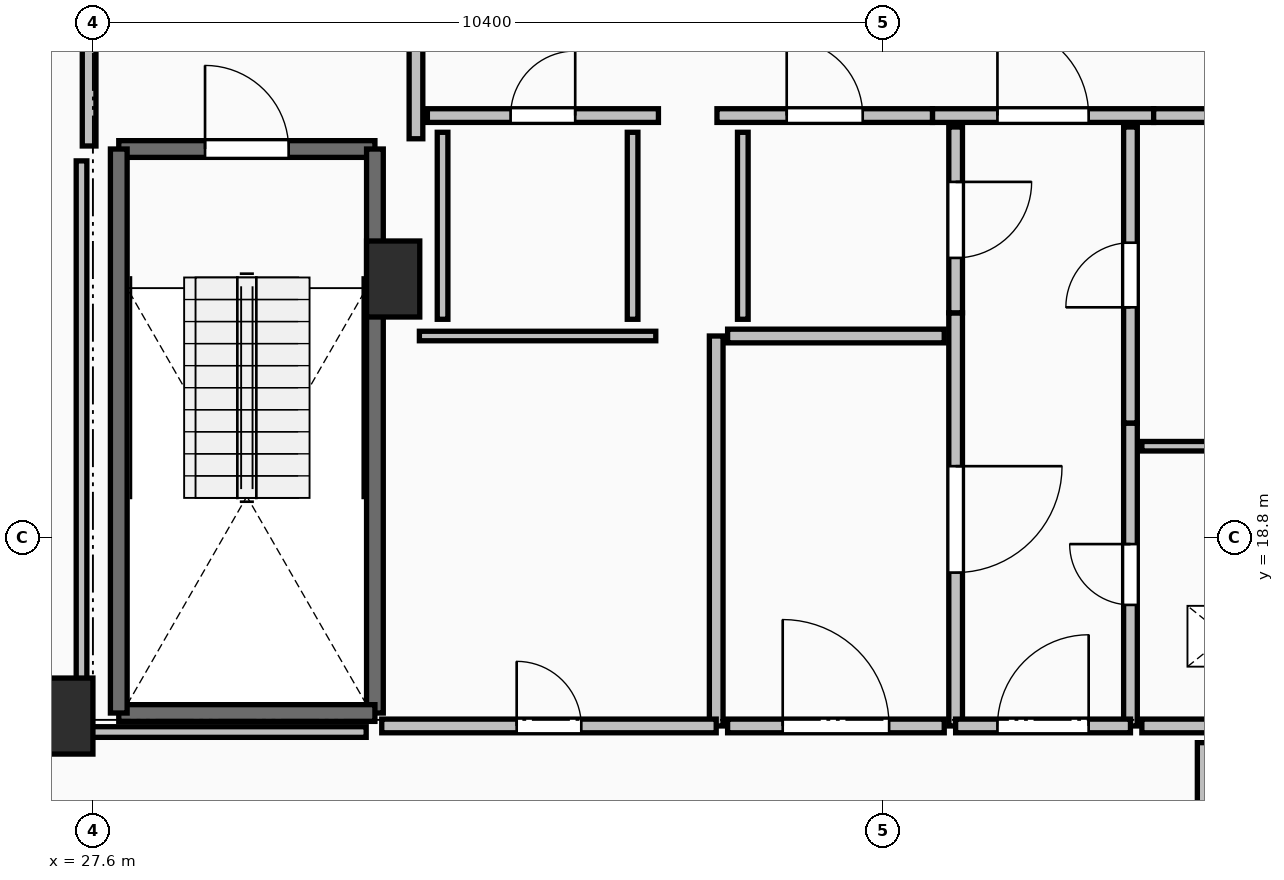
"""IFC4 building model, lengths in metres.
Left out: names, types, materials, properties, quantities, classifications, styles, units other than length and angle.
Written with IfcOpenShell. Run it as: python <this file> out.ifc"""

import sys

from ifc_helpers import new_model, si_unit, direction, frame, frame_2d, origin, origin_2d, place, context, subcontext, project, spatial, rectangle, extrude, element, fill, save


model = new_model("IFC4")
c1 = context("Model", 3, precision=1e-05, world=origin(), true_north=direction((0.0, 1.0)))
c2 = subcontext(c1, "Body", "Model", "MODEL_VIEW")
j1 = project(units=[si_unit("LENGTHUNIT", "METRE"), si_unit("PLANEANGLEUNIT", "RADIAN")], contexts=[c1])
p1 = place(None, origin())
s1 = spatial("IfcSite", under=j1, at=p1, CompositionType="ELEMENT")
p2 = place(p1, origin())
s2 = spatial("IfcBuilding", under=s1, at=p2, CompositionType="ELEMENT")
p3 = place(p2, frame((0.0, 0.0, 255.55)))
s3 = spatial("IfcBuildingStorey", under=s2, at=p3, CompositionType="ELEMENT", Elevation=255.55)
for number, where, z_axis, x_axis in (
    (1, (27.25, 16.45, 0.0), (0.0, 0.0, 1.0), (1.0, 0.0, 0.0)),
    (2, (31.55, 22.2, 0.0), (0.0, 0.0, 1.0), (1.0, 0.0, 0.0)),
):
    element("IfcColumn", number, at=place(p3, frame(where, z_axis=z_axis, x_axis=x_axis)), inside=s3, PredefinedType="PILASTER", context=c2, shape_type="SweptSolid", body=[
        extrude(rectangle(XDim=0.7, YDim=1.0, at=origin_2d()), origin(), (0.0, 0.0, 1.0), 3.55),
    ])
p4 = place(p3, frame((27.94, 23.91, 0.0), z_axis=(0.0, 0.0, 1.0), x_axis=(1.0, 0.0, 0.0)))
e3 = element("IfcWall", 3, at=p4, inside=s3, PredefinedType="SOLIDWALL", context=c2, shape_type="SweptSolid", body=[
    extrude(rectangle(XDim=3.37, YDim=0.22, at=frame_2d((1.685, 0.0))), origin(), (0.0, 0.0, 1.0), 3.29),
])
p5 = place(p4, frame((1.135, 0.0, 0.0)))
e4 = element("IfcOpeningElement", 4, at=p5, cuts=e3, PredefinedType="OPENING", context=c2, shape_type="SweptSolid", body=[
    extrude(rectangle(XDim=1.1, YDim=2.15, at=frame_2d((0.55, 1.075))), frame((0.0, 0.125, 0.0), z_axis=(0.0, -1.0, 0.0), x_axis=(1.0, 0.0, 0.0)), (0.0, 0.0, 1.0), 0.25),
])
p6 = place(p3, frame((31.31, 23.91, 0.0), z_axis=(0.0, 0.0, 1.0), x_axis=(0.0, -1.0, 0.0)))
e5 = element("IfcWall", 5, at=p6, inside=s3, PredefinedType="SOLIDWALL", context=c2, shape_type="SweptSolid", body=[
    extrude(rectangle(XDim=7.42, YDim=0.22, at=frame_2d((3.71, 0.0))), origin(), (0.0, 0.0, 1.0), 3.29),
])
p7 = place(p3, frame((31.31, 16.49, 0.0), z_axis=(0.0, 0.0, 1.0), x_axis=(-1.0, 0.0, 0.0)))
e6 = element("IfcWall", 6, at=p7, inside=s3, PredefinedType="SOLIDWALL", context=c2, shape_type="SweptSolid", body=[
    extrude(rectangle(XDim=3.37, YDim=0.22, at=frame_2d((1.685, 0.0))), origin(), (0.0, 0.0, 1.0), 3.29),
])
p8 = place(p3, frame((27.94, 16.49, 0.0), z_axis=(0.0, 0.0, 1.0), x_axis=(0.0, 1.0, 0.0)))
e7 = element("IfcWall", 7, at=p8, inside=s3, PredefinedType="SOLIDWALL", context=c2, shape_type="SweptSolid", body=[
    extrude(rectangle(XDim=7.42, YDim=0.22, at=frame_2d((3.71, 0.0))), origin(), (0.0, 0.0, 1.0), 3.29),
])
p9 = place(p3, frame((31.85, 24.045, 0.0), z_axis=(0.0, 0.0, 1.0), x_axis=(0.0, 1.0, 0.0)))
e8 = element("IfcWall", 8, at=p9, inside=s3, PredefinedType="PARTITIONING", context=c2, shape_type="SweptSolid", body=[
    extrude(rectangle(XDim=3.91, YDim=0.18, at=frame_2d((1.955, 0.0))), origin(), (0.0, 0.0, 1.0), 3.29),
])
p10 = place(p9, frame((1.355, 0.0, 0.0)))
e9 = element("IfcOpeningElement", 9, at=p10, cuts=e8, PredefinedType="OPENING", context=c2, shape_type="SweptSolid", body=[
    extrude(rectangle(XDim=1.2, YDim=2.15, at=frame_2d((0.6, 1.075))), frame((0.0, 0.105, 0.0), z_axis=(0.0, -1.0, 0.0), x_axis=(1.0, 0.0, 0.0)), (0.0, 0.0, 1.0), 0.21),
])
p11 = place(p3, frame((27.55, 28.0, 0.0), z_axis=(0.0, 0.0, 1.0), x_axis=(0.0, -1.0, 0.0)))
e10 = element("IfcWall", 10, at=p11, inside=s3, PredefinedType="PARTITIONING", context=c2, shape_type="SweptSolid", body=[
    extrude(rectangle(XDim=4.05, YDim=0.18, at=frame_2d((2.025, 0.0))), origin(), (0.0, 0.0, 1.0), 3.29),
])
p12 = place(p11, frame((1.425, 0.0, 0.0)))
e11 = element("IfcOpeningElement", 11, at=p12, cuts=e10, PredefinedType="OPENING", context=c2, shape_type="SweptSolid", body=[
    extrude(rectangle(XDim=1.2, YDim=2.15, at=frame_2d((0.6, 1.075))), frame((0.0, 0.105, 0.0), z_axis=(0.0, -1.0, 0.0), x_axis=(1.0, 0.0, 0.0)), (0.0, 0.0, 1.0), 0.21),
])
p13 = place(p3, frame((38.645, 24.35, 0.0), z_axis=(0.0, 0.0, 1.0), x_axis=(1.0, 0.0, 0.0)))
e12 = element("IfcWall", 12, at=p13, inside=s3, PredefinedType="PARTITIONING", context=c2, shape_type="SweptSolid", body=[
    extrude(rectangle(XDim=2.91, YDim=0.18, at=frame_2d((1.455, 0.0))), origin(), (0.0, 0.0, 1.0), 3.29),
])
p14 = place(p13, frame((0.855, 0.0, 0.0)))
e13 = element("IfcOpeningElement", 13, at=p14, cuts=e12, PredefinedType="OPENING", context=c2, shape_type="SweptSolid", body=[
    extrude(rectangle(XDim=1.2, YDim=2.15, at=frame_2d((0.6, 1.075))), frame((0.0, 0.105, 0.0), z_axis=(0.0, -1.0, 0.0), x_axis=(1.0, 0.0, 0.0)), (0.0, 0.0, 1.0), 0.21),
])
p15 = place(p3, frame((41.555, 24.35, 0.0), z_axis=(0.0, 0.0, 1.0), x_axis=(1.0, 0.0, 0.0)))
e14 = element("IfcWall", 14, at=p15, inside=s3, PredefinedType="PARTITIONING", context=c2, shape_type="SweptSolid", body=[
    extrude(rectangle(XDim=2.445, YDim=0.18, at=frame_2d((1.223, 0.0))), origin(), (0.0, 0.0, 1.0), 3.29),
])
p16 = place(p15, frame((0.798, 0.0, 0.0)))
e15 = element("IfcOpeningElement", 15, at=p16, cuts=e14, PredefinedType="OPENING", context=c2, shape_type="SweptSolid", body=[
    extrude(rectangle(XDim=0.85, YDim=2.1, at=frame_2d((0.425, 1.05))), frame((0.0, 0.105, 0.0), z_axis=(0.0, -1.0, 0.0), x_axis=(1.0, 0.0, 0.0)), (0.0, 0.0, 1.0), 0.21),
])
p17 = place(p3, frame((32.0, 24.35, 0.0), z_axis=(0.0, 0.0, 1.0), x_axis=(1.0, 0.0, 0.0)))
e16 = element("IfcWall", 16, at=p17, inside=s3, PredefinedType="PARTITIONING", context=c2, shape_type="SweptSolid", body=[
    extrude(rectangle(XDim=3.04, YDim=0.18, at=frame_2d((1.52, 0.0))), origin(), (0.0, 0.0, 1.0), 3.29),
])
p18 = place(p17, frame((1.095, 0.0, 0.0)))
e17 = element("IfcOpeningElement", 17, at=p18, cuts=e16, PredefinedType="OPENING", context=c2, shape_type="SweptSolid", body=[
    extrude(rectangle(XDim=0.85, YDim=2.1, at=frame_2d((0.425, 1.05))), frame((0.0, 0.105, 0.0), z_axis=(0.0, -1.0, 0.0), x_axis=(1.0, 0.0, 0.0)), (0.0, 0.0, 1.0), 0.21),
])
p19 = place(p3, frame((35.81, 24.35, 0.0), z_axis=(0.0, 0.0, 1.0), x_axis=(1.0, 0.0, 0.0)))
e18 = element("IfcWall", 18, at=p19, inside=s3, PredefinedType="PARTITIONING", context=c2, shape_type="SweptSolid", body=[
    extrude(rectangle(XDim=2.835, YDim=0.18, at=frame_2d((1.417, 0.0))), origin(), (0.0, 0.0, 1.0), 3.29),
])
p20 = place(p19, frame((0.917, 0.0, 0.0)))
e19 = element("IfcOpeningElement", 19, at=p20, cuts=e18, PredefinedType="OPENING", context=c2, shape_type="SweptSolid", body=[
    extrude(rectangle(XDim=1.0, YDim=2.15, at=frame_2d((0.5, 1.075))), frame((0.0, 0.105, 0.0), z_axis=(0.0, -1.0, 0.0), x_axis=(1.0, 0.0, 0.0)), (0.0, 0.0, 1.0), 0.21),
])
p21 = place(p3, frame((41.25, 16.32, 0.0), z_axis=(0.0, 0.0, 1.0), x_axis=(0.0, 1.0, 0.0)))
e20 = element("IfcWall", 20, at=p21, inside=s3, PredefinedType="PARTITIONING", context=c2, shape_type="SweptSolid", body=[
    extrude(rectangle(XDim=3.985, YDim=0.18, at=frame_2d((1.992, 0.0))), origin(), (0.0, 0.0, 1.0), 3.29),
])
p22 = place(p21, frame((1.593, 0.0, 0.0)))
e21 = element("IfcOpeningElement", 21, at=p22, cuts=e20, PredefinedType="OPENING", context=c2, shape_type="SweptSolid", body=[
    extrude(rectangle(XDim=0.8, YDim=2.05, at=frame_2d((0.4, 1.025))), frame((0.0, 0.105, 0.0), z_axis=(0.0, -1.0, 0.0), x_axis=(1.0, 0.0, 0.0)), (0.0, 0.0, 1.0), 0.21),
])
p23 = place(p3, frame((41.25, 20.305, 0.0), z_axis=(0.0, 0.0, 1.0), x_axis=(0.0, 1.0, 0.0)))
e22 = element("IfcWall", 22, at=p23, inside=s3, PredefinedType="PARTITIONING", context=c2, shape_type="SweptSolid", body=[
    extrude(rectangle(XDim=3.895, YDim=0.18, at=frame_2d((1.948, 0.0))), origin(), (0.0, 0.0, 1.0), 2.482),
])
p24 = place(p23, frame((1.522, 0.0, 0.0)))
e23 = element("IfcOpeningElement", 23, at=p24, cuts=e22, PredefinedType="OPENING", context=c2, shape_type="SweptSolid", body=[
    extrude(rectangle(XDim=0.85, YDim=2.1, at=frame_2d((0.425, 1.05))), frame((0.0, 0.105, 0.0), z_axis=(0.0, -1.0, 0.0), x_axis=(1.0, 0.0, 0.0)), (0.0, 0.0, 1.0), 0.21),
])
p25 = place(p3, frame((38.95, 21.755, 0.0), z_axis=(0.0, 0.0, 1.0), x_axis=(0.0, -1.0, 0.0)))
e24 = element("IfcWall", 24, at=p25, inside=s3, PredefinedType="PARTITIONING", context=c2, shape_type="SweptSolid", body=[
    extrude(rectangle(XDim=5.435, YDim=0.18, at=frame_2d((2.717, 0.0))), origin(), (0.0, 0.0, 1.0), 3.29),
])
p26 = place(p25, frame((2.018, 0.0, 0.0)))
e25 = element("IfcOpeningElement", 25, at=p26, cuts=e24, PredefinedType="OPENING", context=c2, shape_type="SweptSolid", body=[
    extrude(rectangle(XDim=1.4, YDim=2.2, at=frame_2d((0.7, 1.1))), frame((0.0, 0.105, 0.0), z_axis=(0.0, -1.0, 0.0), x_axis=(1.0, 0.0, 0.0)), (0.0, 0.0, 1.0), 0.21),
])
p27 = place(p3, frame((38.95, 24.2, 0.0), z_axis=(0.0, 0.0, 1.0), x_axis=(0.0, -1.0, 0.0)))
e26 = element("IfcWall", 26, at=p27, inside=s3, PredefinedType="PARTITIONING", context=c2, shape_type="SweptSolid", body=[
    extrude(rectangle(XDim=2.445, YDim=0.18, at=frame_2d((1.223, 0.0))), origin(), (0.0, 0.0, 1.0), 2.482),
])
p28 = place(p27, frame((0.722, 0.0, 0.0)))
e27 = element("IfcOpeningElement", 27, at=p28, cuts=e26, PredefinedType="OPENING", context=c2, shape_type="SweptSolid", body=[
    extrude(rectangle(XDim=1.0, YDim=2.15, at=frame_2d((0.5, 1.075))), frame((0.0, 0.105, 0.0), z_axis=(0.0, -1.0, 0.0), x_axis=(1.0, 0.0, 0.0)), (0.0, 0.0, 1.0), 0.21),
])
p29 = place(p3, frame((38.95, 16.32, 0.0), z_axis=(0.0, 0.0, 1.0), x_axis=(1.0, 0.0, 0.0)))
e28 = element("IfcWall", 28, at=p29, inside=s3, PredefinedType="PARTITIONING", context=c2, shape_type="SweptSolid", body=[
    extrude(rectangle(XDim=2.3, YDim=0.18, at=frame_2d((1.15, 0.0))), origin(), (0.0, 0.0, 1.0), 3.29),
])
p30 = place(p29, frame((0.55, 0.0, 0.0)))
e29 = element("IfcOpeningElement", 29, at=p30, cuts=e28, PredefinedType="OPENING", context=c2, shape_type="SweptSolid", body=[
    extrude(rectangle(XDim=1.2, YDim=2.15, at=frame_2d((0.6, 1.075))), frame((0.0, 0.105, 0.0), z_axis=(0.0, -1.0, 0.0), x_axis=(1.0, 0.0, 0.0)), (0.0, 0.0, 1.0), 0.21),
])
p31 = place(p3, frame((44.6, 20.0, 0.0), z_axis=(0.0, 0.0, 1.0), x_axis=(-1.0, 0.0, 0.0)))
e30 = element("IfcWall", 30, at=p31, inside=s3, PredefinedType="PARTITIONING", context=c2, shape_type="SweptSolid", body=[
    extrude(rectangle(XDim=3.2, YDim=0.125, at=frame_2d((1.6, 0.0))), origin(), (0.0, 0.0, 1.0), 3.29),
])
p32 = place(p3, frame((41.4, 16.32, 0.0), z_axis=(0.0, 0.0, 1.0), x_axis=(1.0, 0.0, 0.0)))
e31 = element("IfcWall", 31, at=p32, inside=s3, PredefinedType="PARTITIONING", context=c2, shape_type="SweptSolid", body=[
    extrude(rectangle(XDim=3.2, YDim=0.18, at=frame_2d((1.6, 0.0))), origin(), (0.0, 0.0, 1.0), 3.29),
])
p33 = place(p32, frame((1.2, 0.0, 0.0)))
e32 = element("IfcOpeningElement", 32, at=p33, cuts=e31, PredefinedType="OPENING", context=c2, shape_type="SweptSolid", body=[
    extrude(rectangle(XDim=0.8, YDim=2.05, at=frame_2d((0.4, 1.025))), frame((0.0, 0.105, 0.0), z_axis=(0.0, -1.0, 0.0), x_axis=(1.0, 0.0, 0.0)), (0.0, 0.0, 1.0), 0.21),
])
p34 = place(p3, frame((35.8, 16.32, 0.0), z_axis=(0.0, 0.0, 1.0), x_axis=(0.0, 1.0, 0.0)))
e33 = element("IfcWall", 33, at=p34, inside=s3, PredefinedType="PARTITIONING", context=c2, shape_type="SweptSolid", body=[
    extrude(rectangle(XDim=5.13, YDim=0.18, at=frame_2d((2.565, 0.0))), origin(), (0.0, 0.0, 1.0), 3.29),
])
p35 = place(p3, frame((35.005, 21.45, 0.0), z_axis=(0.0, 0.0, 1.0), x_axis=(-1.0, 0.0, 0.0)))
e34 = element("IfcWall", 34, at=p35, inside=s3, PredefinedType="PARTITIONING", context=c2, shape_type="SweptSolid", body=[
    extrude(rectangle(XDim=3.11, YDim=0.125, at=frame_2d((1.555, 0.0))), origin(), (0.0, 0.0, 1.0), 3.29),
])
p36 = place(p3, frame((31.4, 16.32, 0.0), z_axis=(0.0, 0.0, 1.0), x_axis=(1.0, 0.0, 0.0)))
e35 = element("IfcWall", 35, at=p36, inside=s3, PredefinedType="PARTITIONING", context=c2, shape_type="SweptSolid", body=[
    extrude(rectangle(XDim=4.4, YDim=0.18, at=frame_2d((2.2, 0.0))), origin(), (0.0, 0.0, 1.0), 3.29),
])
p37 = place(p36, frame((1.775, 0.0, 0.0)))
e36 = element("IfcOpeningElement", 36, at=p37, cuts=e35, PredefinedType="OPENING", context=c2, shape_type="SweptSolid", body=[
    extrude(rectangle(XDim=0.85, YDim=2.1, at=frame_2d((0.425, 1.05))), frame((0.0, 0.105, 0.0), z_axis=(0.0, -1.0, 0.0), x_axis=(1.0, 0.0, 0.0)), (0.0, 0.0, 1.0), 0.21),
])
p38 = place(p3, frame((38.8, 21.45, 0.0), z_axis=(0.0, 0.0, 1.0), x_axis=(-1.0, 0.0, 0.0)))
e37 = element("IfcWall", 37, at=p38, inside=s3, PredefinedType="PARTITIONING", context=c2, shape_type="SweptSolid", body=[
    extrude(rectangle(XDim=2.85, YDim=0.18, at=frame_2d((1.425, 0.0))), origin(), (0.0, 0.0, 1.0), 3.29),
])
p39 = place(p3, frame((35.95, 16.32, 0.0), z_axis=(0.0, 0.0, 1.0), x_axis=(1.0, 0.0, 0.0)))
e38 = element("IfcWall", 38, at=p39, inside=s3, PredefinedType="PARTITIONING", context=c2, shape_type="SweptSolid", body=[
    extrude(rectangle(XDim=2.85, YDim=0.18, at=frame_2d((1.425, 0.0))), origin(), (0.0, 0.0, 1.0), 3.29),
])
p40 = place(p39, frame((0.725, 0.0, 0.0)))
e39 = element("IfcOpeningElement", 39, at=p40, cuts=e38, PredefinedType="OPENING", context=c2, shape_type="SweptSolid", body=[
    extrude(rectangle(XDim=1.4, YDim=2.2, at=frame_2d((0.7, 1.1))), frame((0.0, 0.105, 0.0), z_axis=(0.0, -1.0, 0.0), x_axis=(1.0, 0.0, 0.0)), (0.0, 0.0, 1.0), 0.21),
])
for number, where, z_axis, x_axis in (
    (40, (32.2, 24.13, 0.0), (0.0, 0.0, 1.0), (0.0, -1.0, 0.0)),
    (41, (34.7, 21.67, 0.0), (0.0, 0.0, 1.0), (0.0, 1.0, 0.0)),
    (42, (36.15, 24.13, 0.0), (0.0, 0.0, 1.0), (0.0, -1.0, 0.0)),
):
    element("IfcWall", number, at=place(p3, frame(where, z_axis=z_axis, x_axis=x_axis)), inside=s3, PredefinedType="PARTITIONING", context=c2, shape_type="SweptSolid", body=[
        extrude(rectangle(XDim=2.46, YDim=0.14, at=frame_2d((1.23, 0.0))), origin(), (0.0, 0.0, 1.0), 2.482),
    ])
p41 = place(p3, frame((27.45, 23.754, 0.0), z_axis=(0.0, 0.0, 1.0), x_axis=(0.0, -1.0, 0.0)))
e43 = element("IfcWall", 43, at=p41, inside=s3, PredefinedType="PARTITIONING", context=c2, shape_type="SweptSolid", body=[
    extrude(rectangle(XDim=7.514, YDim=0.14, at=frame_2d((3.757, 0.0))), origin(), (0.0, 0.0, 1.0), 2.482),
])
p42 = place(p3, frame((27.45, 16.24, 0.0), z_axis=(0.0, 0.0, 1.0), x_axis=(1.0, 0.0, 0.0)))
e44 = element("IfcWall", 44, at=p42, inside=s3, PredefinedType="PARTITIONING", context=c2, shape_type="SweptSolid", body=[
    extrude(rectangle(XDim=3.745, YDim=0.14, at=frame_2d((1.873, 0.0))), origin(), (0.0, 0.0, 1.0), 2.482),
])
p43 = place(p3, frame((42.2, 16.1, 0.0), z_axis=(0.0, 0.0, 1.0), x_axis=(0.0, -1.0, 0.0)))
e45 = element("IfcWall", 45, at=p43, inside=s3, PredefinedType="PARTITIONING", context=c2, shape_type="SweptSolid", body=[
    extrude(rectangle(XDim=1.85, YDim=0.14, at=frame_2d((0.925, 0.0))), origin(), (0.0, 0.0, 1.0), 3.29),
])
p44 = place(p5, origin())
e46 = element("IfcDoor", 46, at=p44, inside=s3, OperationType="SINGLE_SWING_LEFT", PredefinedType="DOOR", context=c2, shape_type="SweptSolid", body=[
    extrude(rectangle(XDim=1.1, YDim=2.15, at=frame_2d((0.55, 1.075))), frame((0.0, 0.025, 0.0), z_axis=(0.0, -1.0, 0.0), x_axis=(1.0, 0.0, 0.0)), (0.0, 0.0, 1.0), 0.05),
])
fill(e4, e46)
p45 = place(p14, origin())
e47 = element("IfcDoor", 47, at=p45, inside=s3, OperationType="SINGLE_SWING_LEFT", PredefinedType="DOOR", context=c2, shape_type="SweptSolid", body=[
    extrude(rectangle(XDim=1.2, YDim=2.15, at=frame_2d((0.6, 1.075))), frame((0.0, 0.025, 0.0), z_axis=(0.0, -1.0, 0.0), x_axis=(1.0, 0.0, 0.0)), (0.0, 0.0, 1.0), 0.05),
])
fill(e13, e47)
p46 = place(p18, origin())
e48 = element("IfcDoor", 48, at=p46, inside=s3, OperationType="SINGLE_SWING_RIGHT", PredefinedType="DOOR", context=c2, shape_type="SweptSolid", body=[
    extrude(rectangle(XDim=0.85, YDim=2.1, at=frame_2d((0.425, 1.05))), frame((0.0, 0.025, 0.0), z_axis=(0.0, -1.0, 0.0), x_axis=(1.0, 0.0, 0.0)), (0.0, 0.0, 1.0), 0.05),
])
fill(e17, e48)
p47 = place(p20, origin())
e49 = element("IfcDoor", 49, at=p47, inside=s3, OperationType="SINGLE_SWING_LEFT", PredefinedType="DOOR", context=c2, shape_type="SweptSolid", body=[
    extrude(rectangle(XDim=1.0, YDim=2.15, at=frame_2d((0.5, 1.075))), frame((0.0, 0.025, 0.0), z_axis=(0.0, -1.0, 0.0), x_axis=(1.0, 0.0, 0.0)), (0.0, 0.0, 1.0), 0.05),
])
fill(e19, e49)
p48 = place(p22, origin())
e50 = element("IfcDoor", 50, at=p48, inside=s3, OperationType="SINGLE_SWING_RIGHT", PredefinedType="DOOR", context=c2, shape_type="SweptSolid", body=[
    extrude(rectangle(XDim=0.8, YDim=2.05, at=frame_2d((0.4, 1.025))), frame((0.0, 0.025, 0.0), z_axis=(0.0, -1.0, 0.0), x_axis=(1.0, 0.0, 0.0)), (0.0, 0.0, 1.0), 0.05),
])
fill(e21, e50)
p49 = place(p24, origin())
e51 = element("IfcDoor", 51, at=p49, inside=s3, OperationType="SINGLE_SWING_LEFT", PredefinedType="DOOR", context=c2, shape_type="SweptSolid", body=[
    extrude(rectangle(XDim=0.85, YDim=2.1, at=frame_2d((0.425, 1.05))), frame((0.0, 0.025, 0.0), z_axis=(0.0, -1.0, 0.0), x_axis=(1.0, 0.0, 0.0)), (0.0, 0.0, 1.0), 0.05),
])
fill(e23, e51)
p50 = place(p26, origin())
e52 = element("IfcDoor", 52, at=p50, inside=s3, OperationType="DOUBLE_SWING_LEFT", PredefinedType="DOOR", context=c2, shape_type="SweptSolid", body=[
    extrude(rectangle(XDim=1.4, YDim=2.2, at=frame_2d((0.7, 1.1))), frame((0.0, 0.025, 0.0), z_axis=(0.0, -1.0, 0.0), x_axis=(1.0, 0.0, 0.0)), (0.0, 0.0, 1.0), 0.05),
])
fill(e25, e52)
p51 = place(p28, origin())
e53 = element("IfcDoor", 53, at=p51, inside=s3, OperationType="SINGLE_SWING_LEFT", PredefinedType="DOOR", context=c2, shape_type="SweptSolid", body=[
    extrude(rectangle(XDim=1.0, YDim=2.15, at=frame_2d((0.5, 1.075))), frame((0.0, 0.025, 0.0), z_axis=(0.0, -1.0, 0.0), x_axis=(1.0, 0.0, 0.0)), (0.0, 0.0, 1.0), 0.05),
])
fill(e27, e53)
p52 = place(p30, origin())
e54 = element("IfcDoor", 54, at=p52, inside=s3, OperationType="SINGLE_SWING_RIGHT", PredefinedType="DOOR", context=c2, shape_type="SweptSolid", body=[
    extrude(rectangle(XDim=1.2, YDim=2.15, at=frame_2d((0.6, 1.075))), frame((0.0, 0.025, 0.0), z_axis=(0.0, -1.0, 0.0), x_axis=(1.0, 0.0, 0.0)), (0.0, 0.0, 1.0), 0.05),
])
fill(e29, e54)
p53 = place(p37, origin())
e55 = element("IfcDoor", 55, at=p53, inside=s3, OperationType="SINGLE_SWING_LEFT", PredefinedType="DOOR", context=c2, shape_type="SweptSolid", body=[
    extrude(rectangle(XDim=0.85, YDim=2.1, at=frame_2d((0.425, 1.05))), frame((0.0, 0.025, 0.0), z_axis=(0.0, -1.0, 0.0), x_axis=(1.0, 0.0, 0.0)), (0.0, 0.0, 1.0), 0.05),
])
fill(e36, e55)
p54 = place(p40, origin())
e56 = element("IfcDoor", 56, at=p54, inside=s3, OperationType="DOUBLE_SWING_LEFT", PredefinedType="DOOR", context=c2, shape_type="SweptSolid", body=[
    extrude(rectangle(XDim=1.4, YDim=2.2, at=frame_2d((0.7, 1.1))), frame((0.0, 0.025, 0.0), z_axis=(0.0, -1.0, 0.0), x_axis=(1.0, 0.0, 0.0)), (0.0, 0.0, 1.0), 0.05),
])
fill(e39, e56)
save(model, sys.argv[1])
